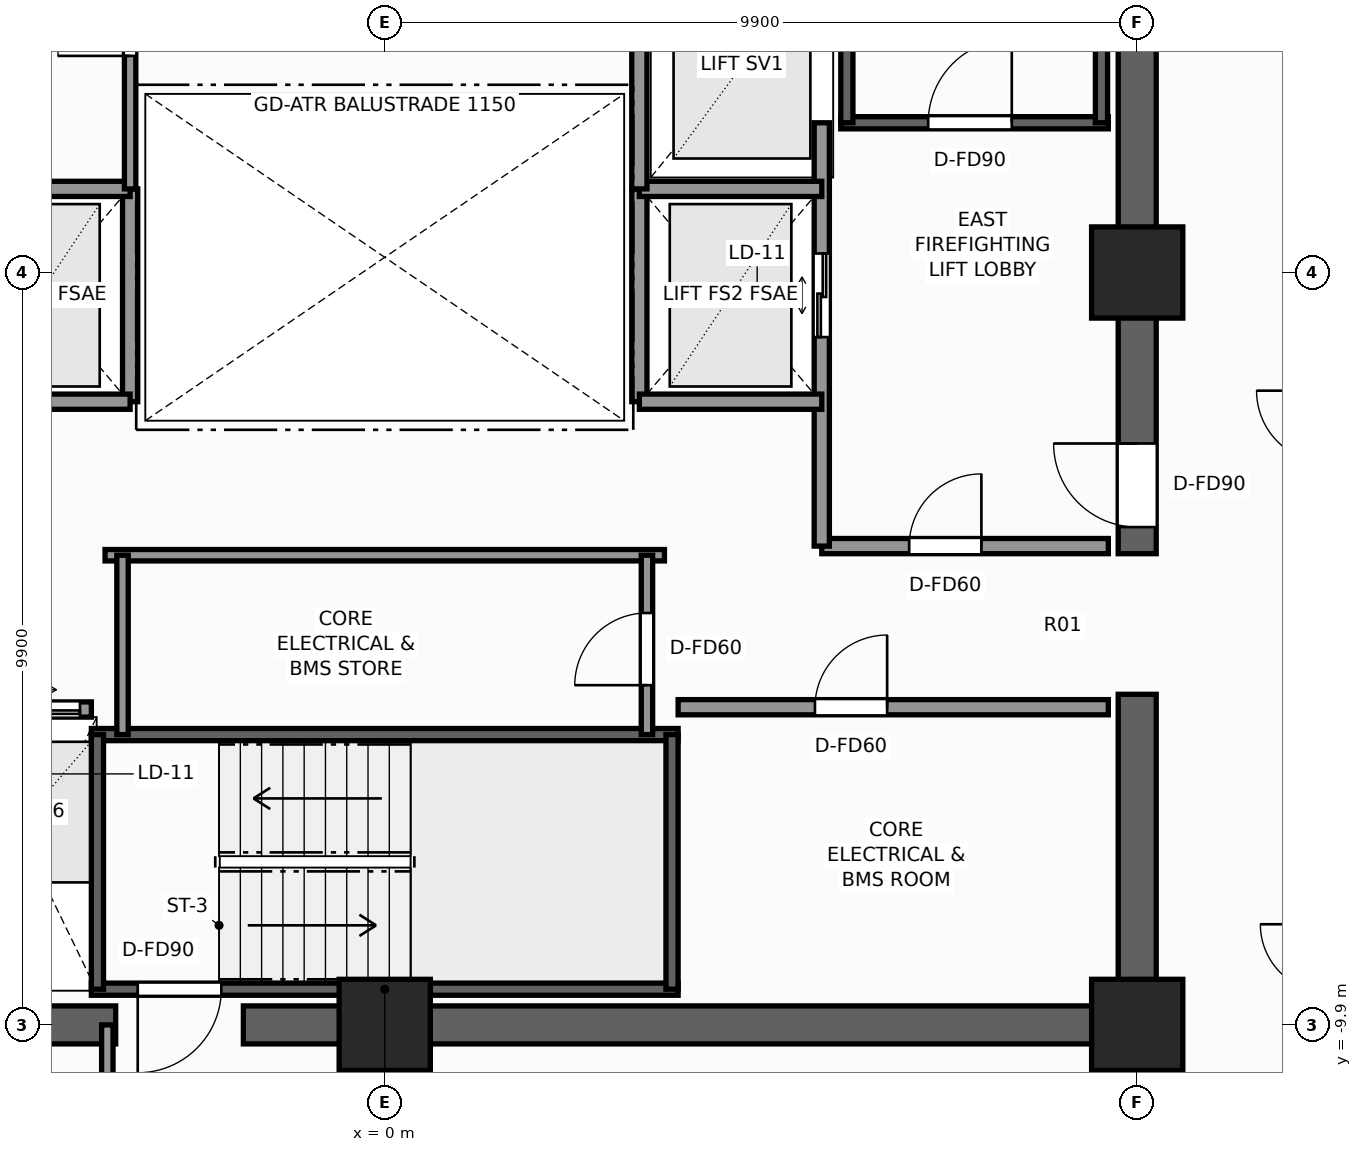
"""IFC4 building model, lengths in metres.
Left out: names, types, materials, properties, quantities, classifications, styles, units other than length and angle.
Written with IfcOpenShell. Run it as: python <this file> out.ifc"""

import sys

from ifc_helpers import new_model, si_unit, direction, frame, frame_2d, origin, origin_2d, place, context, subcontext, project, spatial, rectangle, extrude, element, fill, save


model = new_model("IFC4")
c1 = context("Model", 3, precision=1e-05, world=origin(), true_north=direction((0.0, 1.0)))
c2 = subcontext(c1, "Body", "Model", "MODEL_VIEW")
j1 = project(units=[si_unit("LENGTHUNIT", "METRE"), si_unit("PLANEANGLEUNIT", "RADIAN")], contexts=[c1])
p1 = place(None, origin())
s1 = spatial("IfcSite", under=j1, at=p1, CompositionType="ELEMENT")
p2 = place(p1, origin())
s2 = spatial("IfcBuilding", under=s1, at=p2, CompositionType="ELEMENT")
p3 = place(p2, frame((0.0, 0.0, 144.8)))
s3 = spatial("IfcBuildingStorey", under=s2, at=p3, CompositionType="ELEMENT", Elevation=144.8)
p4 = place(p3, frame((10.15, -9.9, 0.0), z_axis=(0.0, 0.0, 1.0), x_axis=(-1.0, 0.0, 0.0)))
e1 = element("IfcWall", 1, at=p4, inside=s3, PredefinedType="SHEAR", context=c2, shape_type="SweptSolid", body=[
    extrude(rectangle(XDim=12.01, YDim=0.5, at=frame_2d((6.005, 0.0))), origin(), (0.0, 0.0, 1.0), 3.3),
])
p5 = place(p3, frame((-3.54, -9.9, 0.0), z_axis=(0.0, 0.0, 1.0), x_axis=(-1.0, 0.0, 0.0)))
e2 = element("IfcWall", 2, at=p5, inside=s3, PredefinedType="SHEAR", context=c2, shape_type="SweptSolid", body=[
    extrude(rectangle(XDim=6.61, YDim=0.5, at=frame_2d((3.305, 0.0))), origin(), (0.0, 0.0, 1.0), 3.3),
])
p6 = place(p3, frame((9.9, -9.65, 0.0), z_axis=(0.0, 0.0, 1.0), x_axis=(0.0, 1.0, 0.0)))
e3 = element("IfcWall", 3, at=p6, inside=s3, PredefinedType="SHEAR", context=c2, shape_type="SweptSolid", body=[
    extrude(rectangle(XDim=4.1, YDim=0.5, at=frame_2d((2.05, 0.0))), origin(), (0.0, 0.0, 1.0), 3.3),
])
p7 = place(p3, frame((9.9, -3.7, 0.0), z_axis=(0.0, 0.0, 1.0), x_axis=(0.0, 1.0, 0.0)))
e4 = element("IfcWall", 4, at=p7, inside=s3, PredefinedType="SHEAR", context=c2, shape_type="SweptSolid", body=[
    extrude(rectangle(XDim=13.35, YDim=0.5, at=frame_2d((6.675, 0.0))), origin(), (0.0, 0.0, 1.0), 3.3),
])
p8 = place(p7, frame((0.35, 0.0, 0.0)))
e5 = element("IfcOpeningElement", 5, at=p8, cuts=e4, PredefinedType="OPENING", context=c2, shape_type="SweptSolid", body=[
    extrude(rectangle(XDim=1.1, YDim=2.2, at=frame_2d((0.55, 1.1))), frame((0.0, 0.26, 0.0), z_axis=(0.0, -1.0, 0.0), x_axis=(1.0, 0.0, 0.0)), (0.0, 0.0, 1.0), 0.52),
])
for number, where, z_axis, x_axis in (
    (6, (9.9, -9.9, 0.0), (0.0, 0.0, 1.0), (1.0, 0.0, 0.0)),
    (7, (0.0, -9.9, 0.0), (0.0, 0.0, 1.0), (1.0, 0.0, 0.0)),
    (8, (9.9, 0.0, 0.0), (0.0, 0.0, 1.0), (1.0, 0.0, 0.0)),
):
    element("IfcColumn", number, at=place(p3, frame(where, z_axis=z_axis, x_axis=x_axis)), inside=s3, PredefinedType="COLUMN", context=c2, shape_type="SweptSolid", body=[
        extrude(rectangle(XDim=1.2, YDim=1.2, at=origin_2d()), origin(), (0.0, 0.0, 1.0), 3.3),
    ])
p9 = place(p3, frame((6.0, 1.97, 0.0), z_axis=(0.0, 0.0, 1.0), x_axis=(1.0, 0.0, 0.0)))
e9 = element("IfcWall", 9, at=p9, inside=s3, PredefinedType="SHEAR", context=c2, shape_type="SweptSolid", body=[
    extrude(rectangle(XDim=3.52, YDim=0.16, at=frame_2d((1.76, 0.0))), origin(), (0.0, 0.0, 1.0), 3.3),
])
p10 = place(p9, frame((1.15, 0.0, 0.0)))
e10 = element("IfcOpeningElement", 10, at=p10, cuts=e9, PredefinedType="OPENING", context=c2, shape_type="SweptSolid", body=[
    extrude(rectangle(XDim=1.1, YDim=2.2, at=frame_2d((0.55, 1.1))), frame((0.0, 0.09, 0.0), z_axis=(0.0, -1.0, 0.0), x_axis=(1.0, 0.0, 0.0)), (0.0, 0.0, 1.0), 0.18),
])
for number, where, z_axis, x_axis in (
    (11, (6.08, 1.97, 0.0), (0.0, 0.0, 1.0), (0.0, 1.0, 0.0)),
    (12, (9.43, 1.97, 0.0), (0.0, 0.0, 1.0), (0.0, 1.0, 0.0)),
):
    element("IfcWall", number, at=place(p3, frame(where, z_axis=z_axis, x_axis=x_axis)), inside=s3, PredefinedType="SHEAR", context=c2, shape_type="SweptSolid", body=[
        extrude(rectangle(XDim=7.56, YDim=0.16, at=frame_2d((3.78, 0.0))), origin(), (0.0, 0.0, 1.0), 3.3),
    ])
p11 = place(p3, frame((3.86, -9.43, 0.0), z_axis=(0.0, 0.0, 1.0), x_axis=(-1.0, 0.0, 0.0)))
e13 = element("IfcWall", 13, at=p11, inside=s3, PredefinedType="SHEAR", context=c2, shape_type="SweptSolid", body=[
    extrude(rectangle(XDim=7.72, YDim=0.16, at=frame_2d((3.86, 0.0))), origin(), (0.0, 0.0, 1.0), 3.3),
])
p12 = place(p11, frame((6.01, 0.0, 0.0)))
e14 = element("IfcOpeningElement", 14, at=p12, cuts=e13, PredefinedType="OPENING", context=c2, shape_type="SweptSolid", body=[
    extrude(rectangle(XDim=1.1, YDim=2.2, at=frame_2d((0.55, 1.1))), frame((0.0, 0.09, 0.0), z_axis=(0.0, -1.0, 0.0), x_axis=(1.0, 0.0, 0.0)), (0.0, 0.0, 1.0), 0.18),
])
p13 = place(p3, frame((-3.86, -6.08, 0.0), z_axis=(0.0, 0.0, 1.0), x_axis=(1.0, 0.0, 0.0)))
e15 = element("IfcWall", 15, at=p13, inside=s3, PredefinedType="SHEAR", context=c2, shape_type="SweptSolid", body=[
    extrude(rectangle(XDim=7.72, YDim=0.16, at=frame_2d((3.86, 0.0))), origin(), (0.0, 0.0, 1.0), 3.3),
])
for number, where, z_axis, x_axis in (
    (16, (-3.78, -9.43, 0.0), (0.0, 0.0, 1.0), (0.0, 1.0, 0.0)),
    (17, (3.78, -9.43, 0.0), (0.0, 0.0, 1.0), (0.0, 1.0, 0.0)),
):
    element("IfcWall", number, at=place(p3, frame(where, z_axis=z_axis, x_axis=x_axis)), inside=s3, PredefinedType="SHEAR", context=c2, shape_type="SweptSolid", body=[
        extrude(rectangle(XDim=3.35, YDim=0.16, at=frame_2d((1.675, 0.0))), origin(), (0.0, 0.0, 1.0), 3.3),
    ])
p14 = place(p3, frame((-3.35, -1.7, 0.0), z_axis=(0.0, 0.0, 1.0), x_axis=(0.0, 1.0, 0.0)))
e18 = element("IfcWall", 18, at=p14, inside=s3, PredefinedType="SOLIDWALL", context=c2, shape_type="SweptSolid", body=[
    extrude(rectangle(XDim=2.8, YDim=0.2, at=frame_2d((1.4, 0.0))), origin(), (0.0, 0.0, 1.0), 2.585),
])
for number, where, z_axis, x_axis in (
    (19, (-5.75, -1.7, 0.0), (0.0, 0.0, 1.0), (1.0, 0.0, 0.0)),
    (20, (-5.75, 1.1, 0.0), (0.0, 0.0, 1.0), (1.0, 0.0, 0.0)),
):
    element("IfcWall", number, at=place(p3, frame(where, z_axis=z_axis, x_axis=x_axis)), inside=s3, PredefinedType="SOLIDWALL", context=c2, shape_type="SweptSolid", body=[
        extrude(rectangle(XDim=2.4, YDim=0.2, at=frame_2d((1.2, 0.0))), origin(), (0.0, 0.0, 1.0), 2.95),
    ])
p15 = place(p3, frame((5.75, -3.6, 0.0), z_axis=(0.0, 0.0, 1.0), x_axis=(1.0, 0.0, 0.0)))
e21 = element("IfcWall", 21, at=p15, inside=s3, PredefinedType="SOLIDWALL", context=c2, shape_type="SweptSolid", body=[
    extrude(rectangle(XDim=3.77, YDim=0.2, at=frame_2d((1.885, 0.0))), origin(), (0.0, 0.0, 1.0), 2.95),
])
p16 = place(p15, frame((1.15, 0.0, 0.0)))
e22 = element("IfcOpeningElement", 22, at=p16, cuts=e21, PredefinedType="OPENING", context=c2, shape_type="SweptSolid", body=[
    extrude(rectangle(XDim=0.95, YDim=2.06, at=frame_2d((0.475, 1.03))), frame((0.0, 0.11, 0.0), z_axis=(0.0, -1.0, 0.0), x_axis=(1.0, 0.0, 0.0)), (0.0, 0.0, 1.0), 0.22),
])
p17 = place(p3, frame((5.75, -3.6, 0.0), z_axis=(0.0, 0.0, 1.0), x_axis=(0.0, 1.0, 0.0)))
e23 = element("IfcWall", 23, at=p17, inside=s3, PredefinedType="SOLIDWALL", context=c2, shape_type="SweptSolid", body=[
    extrude(rectangle(XDim=5.57, YDim=0.2, at=frame_2d((2.785, 0.0))), origin(), (0.0, 0.0, 1.0), 2.585),
])
p18 = place(p17, frame((2.75, 0.0, 0.0)))
e24 = element("IfcOpeningElement", 24, at=p18, cuts=e23, PredefinedType="OPENING", context=c2, shape_type="SweptSolid", body=[
    extrude(rectangle(XDim=1.1, YDim=2.2, at=frame_2d((0.55, 1.1))), frame((0.0, 0.11, 0.0), z_axis=(0.0, -1.0, 0.0), x_axis=(1.0, 0.0, 0.0)), (0.0, 0.0, 1.0), 0.22),
])
p19 = place(p3, frame((3.35, -1.7, 0.0), z_axis=(0.0, 0.0, 1.0), x_axis=(0.0, 1.0, 0.0)))
e25 = element("IfcWall", 25, at=p19, inside=s3, PredefinedType="SOLIDWALL", context=c2, shape_type="SweptSolid", body=[
    extrude(rectangle(XDim=2.8, YDim=0.2, at=frame_2d((1.4, 0.0))), origin(), (0.0, 0.0, 1.0), 2.585),
])
for number, where, z_axis, x_axis in (
    (26, (3.35, -1.7, 0.0), (0.0, 0.0, 1.0), (1.0, 0.0, 0.0)),
    (27, (3.35, 1.1, 0.0), (0.0, 0.0, 1.0), (1.0, 0.0, 0.0)),
):
    element("IfcWall", number, at=place(p3, frame(where, z_axis=z_axis, x_axis=x_axis)), inside=s3, PredefinedType="SOLIDWALL", context=c2, shape_type="SweptSolid", body=[
        extrude(rectangle(XDim=2.4, YDim=0.2, at=frame_2d((1.2, 0.0))), origin(), (0.0, 0.0, 1.0), 2.95),
    ])
p20 = place(p3, frame((3.35, 1.1, 0.0), z_axis=(0.0, 0.0, 1.0), x_axis=(0.0, 1.0, 0.0)))
e28 = element("IfcWall", 28, at=p20, inside=s3, PredefinedType="SOLIDWALL", context=c2, shape_type="SweptSolid", body=[
    extrude(rectangle(XDim=3.2, YDim=0.2, at=frame_2d((1.6, 0.0))), origin(), (0.0, 0.0, 1.0), 2.585),
])
p21 = place(p3, frame((-9.52, -5.75, 0.0), z_axis=(0.0, 0.0, 1.0), x_axis=(1.0, 0.0, 0.0)))
e29 = element("IfcWall", 29, at=p21, inside=s3, PredefinedType="SOLIDWALL", context=c2, shape_type="SweptSolid", body=[
    extrude(rectangle(XDim=5.66, YDim=0.2, at=frame_2d((2.83, 0.0))), origin(), (0.0, 0.0, 1.0), 2.95),
])
p22 = place(p21, frame((0.55, 0.0, 0.0)))
e30 = element("IfcOpeningElement", 30, at=p22, cuts=e29, PredefinedType="OPENING", context=c2, shape_type="SweptSolid", body=[
    extrude(rectangle(XDim=1.1, YDim=2.2, at=frame_2d((0.55, 1.1))), frame((0.0, 0.11, 0.0), z_axis=(0.0, -1.0, 0.0), x_axis=(1.0, 0.0, 0.0)), (0.0, 0.0, 1.0), 0.22),
])
p23 = place(p21, frame((2.48, 0.0, 0.0)))
e31 = element("IfcOpeningElement", 31, at=p23, cuts=e29, PredefinedType="OPENING", context=c2, shape_type="SweptSolid", body=[
    extrude(rectangle(XDim=1.1, YDim=2.2, at=frame_2d((0.55, 1.1))), frame((0.0, 0.11, 0.0), z_axis=(0.0, -1.0, 0.0), x_axis=(1.0, 0.0, 0.0)), (0.0, 0.0, 1.0), 0.22),
])
p24 = place(p21, frame((4.41, 0.0, 0.0)))
e32 = element("IfcOpeningElement", 32, at=p24, cuts=e29, PredefinedType="OPENING", context=c2, shape_type="SweptSolid", body=[
    extrude(rectangle(XDim=1.1, YDim=2.2, at=frame_2d((0.55, 1.1))), frame((0.0, 0.11, 0.0), z_axis=(0.0, -1.0, 0.0), x_axis=(1.0, 0.0, 0.0)), (0.0, 0.0, 1.0), 0.22),
])
p25 = place(p3, frame((3.86, -5.72, 0.0), z_axis=(0.0, 0.0, 1.0), x_axis=(1.0, 0.0, 0.0)))
e33 = element("IfcWall", 33, at=p25, inside=s3, PredefinedType="SOLIDWALL", context=c2, shape_type="SweptSolid", body=[
    extrude(rectangle(XDim=5.66, YDim=0.2, at=frame_2d((2.83, 0.0))), origin(), (0.0, 0.0, 1.0), 2.95),
])
p26 = place(p25, frame((1.8, 0.0, 0.0)))
e34 = element("IfcOpeningElement", 34, at=p26, cuts=e33, PredefinedType="OPENING", context=c2, shape_type="SweptSolid", body=[
    extrude(rectangle(XDim=0.95, YDim=2.06, at=frame_2d((0.475, 1.03))), frame((0.0, 0.11, 0.0), z_axis=(0.0, -1.0, 0.0), x_axis=(1.0, 0.0, 0.0)), (0.0, 0.0, 1.0), 0.22),
])
p27 = place(p3, frame((-3.68, -3.72, 0.0), z_axis=(0.0, 0.0, 1.0), x_axis=(1.0, 0.0, 0.0)))
e35 = element("IfcWall", 35, at=p27, inside=s3, PredefinedType="PARTITIONING", context=c2, shape_type="SweptSolid", body=[
    extrude(rectangle(XDim=7.36, YDim=0.15, at=frame_2d((3.68, 0.0))), origin(), (0.0, 0.0, 1.0), 2.95),
])
p28 = place(p3, frame((3.45, -6.08, 0.0), z_axis=(0.0, 0.0, 1.0), x_axis=(0.0, 1.0, 0.0)))
e36 = element("IfcWall", 36, at=p28, inside=s3, PredefinedType="PARTITIONING", context=c2, shape_type="SweptSolid", body=[
    extrude(rectangle(XDim=2.36, YDim=0.15, at=frame_2d((1.18, 0.0))), origin(), (0.0, 0.0, 1.0), 2.95),
])
p29 = place(p28, frame((0.65, 0.0, 0.0)))
e37 = element("IfcOpeningElement", 37, at=p29, cuts=e36, PredefinedType="OPENING", context=c2, shape_type="SweptSolid", body=[
    extrude(rectangle(XDim=0.95, YDim=2.06, at=frame_2d((0.475, 1.03))), frame((0.0, 0.085, 0.0), z_axis=(0.0, -1.0, 0.0), x_axis=(1.0, 0.0, 0.0)), (0.0, 0.0, 1.0), 0.17),
])
p30 = place(p3, frame((-3.45, -6.08, 0.0), z_axis=(0.0, 0.0, 1.0), x_axis=(0.0, 1.0, 0.0)))
e38 = element("IfcWall", 38, at=p30, inside=s3, PredefinedType="PARTITIONING", context=c2, shape_type="SweptSolid", body=[
    extrude(rectangle(XDim=2.36, YDim=0.15, at=frame_2d((1.18, 0.0))), origin(), (0.0, 0.0, 1.0), 2.95),
])
p31 = place(p3, frame((-3.35, 1.1, 0.0), z_axis=(0.0, 0.0, 1.0), x_axis=(0.0, 1.0, 0.0)))
e39 = element("IfcWall", 39, at=p31, inside=s3, PredefinedType="PARTITIONING", context=c2, shape_type="SweptSolid", body=[
    extrude(rectangle(XDim=3.2, YDim=0.15, at=frame_2d((1.6, 0.0))), origin(), (0.0, 0.0, 1.0), 2.585),
])
p32 = place(p31, frame((1.75, 0.0, 0.0)))
e40 = element("IfcOpeningElement", 40, at=p32, cuts=e39, PredefinedType="OPENING", context=c2, shape_type="SweptSolid", body=[
    extrude(rectangle(XDim=0.95, YDim=2.06, at=frame_2d((0.475, 1.03))), frame((0.0, 0.085, 0.0), z_axis=(0.0, -1.0, 0.0), x_axis=(1.0, 0.0, 0.0)), (0.0, 0.0, 1.0), 0.17),
])
p33 = place(p3, frame((-3.65, -12.58, 0.0), z_axis=(0.0, 0.0, 1.0), x_axis=(0.0, 1.0, 0.0)))
e41 = element("IfcWall", 41, at=p33, inside=s3, PredefinedType="PARTITIONING", context=c2, shape_type="SweptSolid", body=[
    extrude(rectangle(XDim=2.68, YDim=0.15, at=frame_2d((1.34, 0.0))), origin(), (0.0, 0.0, 1.0), 2.95),
])
p34 = place(p10, origin())
e42 = element("IfcDoor", 42, at=p34, inside=s3, OperationType="SINGLE_SWING_RIGHT", PredefinedType="DOOR", context=c2, shape_type="SweptSolid", body=[
    extrude(rectangle(XDim=1.1, YDim=2.2, at=frame_2d((0.55, 1.1))), frame((0.0, 0.025, 0.0), z_axis=(0.0, -1.0, 0.0), x_axis=(1.0, 0.0, 0.0)), (0.0, 0.0, 1.0), 0.05),
])
fill(e10, e42)
p35 = place(p12, origin())
e43 = element("IfcDoor", 43, at=p35, inside=s3, OperationType="SINGLE_SWING_RIGHT", PredefinedType="DOOR", context=c2, shape_type="SweptSolid", body=[
    extrude(rectangle(XDim=1.1, YDim=2.2, at=frame_2d((0.55, 1.1))), frame((0.0, 0.025, 0.0), z_axis=(0.0, -1.0, 0.0), x_axis=(1.0, 0.0, 0.0)), (0.0, 0.0, 1.0), 0.05),
])
fill(e14, e43)
p36 = place(p8, origin())
e44 = element("IfcDoor", 44, at=p36, inside=s3, OperationType="SINGLE_SWING_RIGHT", PredefinedType="DOOR", context=c2, shape_type="SweptSolid", body=[
    extrude(rectangle(XDim=1.1, YDim=2.2, at=frame_2d((0.55, 1.1))), frame((0.0, 0.025, 0.0), z_axis=(0.0, -1.0, 0.0), x_axis=(1.0, 0.0, 0.0)), (0.0, 0.0, 1.0), 0.05),
])
fill(e5, e44)
p37 = place(p18, origin())
e45 = element("IfcDoor", 45, at=p37, inside=s3, OperationType="DOUBLE_DOOR_SLIDING", PredefinedType="DOOR", context=c2, shape_type="SweptSolid", body=[
    extrude(rectangle(XDim=1.1, YDim=2.2, at=frame_2d((0.55, 1.1))), frame((0.0, 0.025, 0.0), z_axis=(0.0, -1.0, 0.0), x_axis=(1.0, 0.0, 0.0)), (0.0, 0.0, 1.0), 0.05),
])
fill(e24, e45)
p38 = place(p24, origin())
e46 = element("IfcDoor", 46, at=p38, inside=s3, OperationType="DOUBLE_DOOR_SLIDING", PredefinedType="DOOR", context=c2, shape_type="SweptSolid", body=[
    extrude(rectangle(XDim=1.1, YDim=2.2, at=frame_2d((0.55, 1.1))), frame((0.0, 0.025, 0.0), z_axis=(0.0, -1.0, 0.0), x_axis=(1.0, 0.0, 0.0)), (0.0, 0.0, 1.0), 0.05),
])
fill(e32, e46)
p39 = place(p26, origin())
e47 = element("IfcDoor", 47, at=p39, inside=s3, OperationType="SINGLE_SWING_RIGHT", PredefinedType="DOOR", context=c2, shape_type="SweptSolid", body=[
    extrude(rectangle(XDim=0.95, YDim=2.06, at=frame_2d((0.475, 1.03))), frame((0.0, 0.025, 0.0), z_axis=(0.0, -1.0, 0.0), x_axis=(1.0, 0.0, 0.0)), (0.0, 0.0, 1.0), 0.05),
])
fill(e34, e47)
p40 = place(p16, origin())
e48 = element("IfcDoor", 48, at=p40, inside=s3, OperationType="SINGLE_SWING_RIGHT", PredefinedType="DOOR", context=c2, shape_type="SweptSolid", body=[
    extrude(rectangle(XDim=0.95, YDim=2.06, at=frame_2d((0.475, 1.03))), frame((0.0, 0.025, 0.0), z_axis=(0.0, -1.0, 0.0), x_axis=(1.0, 0.0, 0.0)), (0.0, 0.0, 1.0), 0.05),
])
fill(e22, e48)
p41 = place(p29, origin())
e49 = element("IfcDoor", 49, at=p41, inside=s3, OperationType="SINGLE_SWING_LEFT", PredefinedType="DOOR", context=c2, shape_type="SweptSolid", body=[
    extrude(rectangle(XDim=0.95, YDim=2.06, at=frame_2d((0.475, 1.03))), frame((0.0, 0.025, 0.0), z_axis=(0.0, -1.0, 0.0), x_axis=(1.0, 0.0, 0.0)), (0.0, 0.0, 1.0), 0.05),
])
fill(e37, e49)
p42 = place(p32, origin())
e50 = element("IfcDoor", 50, at=p42, inside=s3, OperationType="SINGLE_SWING_LEFT", PredefinedType="DOOR", context=c2, shape_type="SweptSolid", body=[
    extrude(rectangle(XDim=0.95, YDim=2.06, at=frame_2d((0.475, 1.03))), frame((0.0, 0.025, 0.0), z_axis=(0.0, -1.0, 0.0), x_axis=(1.0, 0.0, 0.0)), (0.0, 0.0, 1.0), 0.05),
])
fill(e40, e50)
save(model, sys.argv[1])
